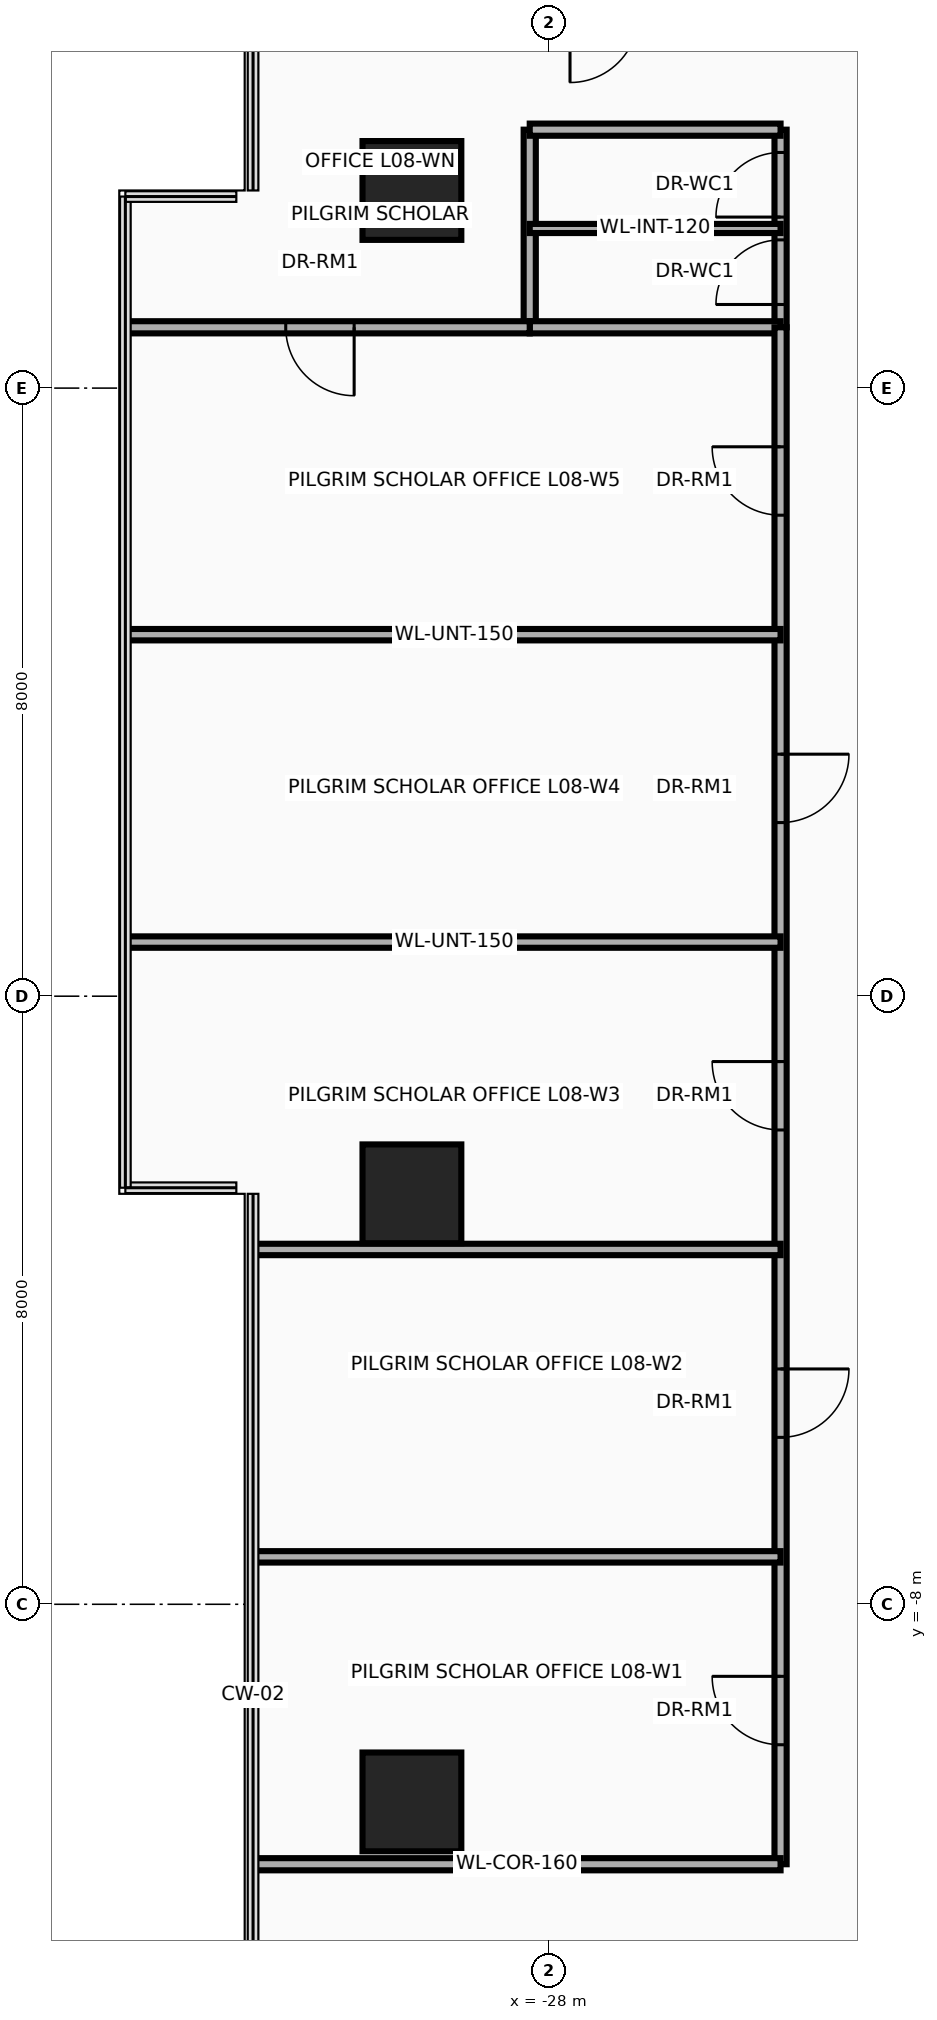
"""IFC4 building model, lengths in metres.
Left out: names, types, materials, properties, quantities, classifications, styles, units other than length and angle.
Written with IfcOpenShell. Run it as: python <this file> out.ifc"""

import sys

from ifc_helpers import new_model, si_unit, direction, frame, frame_2d, origin, origin_2d, place, context, subcontext, project, spatial, rectangle, circle, extrude, source, transform, mapped, element, fill, save


model = new_model("IFC4")
c1 = context("Model", 3, precision=1e-05, world=origin(), true_north=direction((0.0, 1.0)))
c2 = subcontext(c1, "Body", "Model", "MODEL_VIEW")
j1 = project(units=[si_unit("LENGTHUNIT", "METRE"), si_unit("PLANEANGLEUNIT", "RADIAN")], contexts=[c1])
p1 = place(None, origin())
s1 = spatial("IfcSite", under=j1, at=p1, CompositionType="ELEMENT")
p2 = place(p1, origin())
s2 = spatial("IfcBuilding", under=s1, at=p2, CompositionType="ELEMENT")
p3 = place(p2, frame((0.0, 0.0, 37.1)))
s3 = spatial("IfcBuildingStorey", under=s2, at=p3, CompositionType="ELEMENT", Elevation=37.1)
m1 = source(origin(), c2, "Body", "SweptSolid", [
    extrude(circle(Radius=0.65, at=origin_2d()), origin(), (0.0, 0.0, 1.0), 3.7),
])
for number, where, z_axis, x_axis in (
    (1, (-29.8, -10.6, 0.0), (0.0, 0.0, 1.0), (1.0, 0.0, 0.0)),
    (2, (-29.8, -2.6, 0.0), (0.0, 0.0, 1.0), (1.0, 0.0, 0.0)),
    (3, (-29.8, 10.6, 0.0), (0.0, 0.0, 1.0), (1.0, 0.0, 0.0)),
):
    element("IfcColumn", number, at=place(p3, frame(where, z_axis=z_axis, x_axis=x_axis)), inside=s3, PredefinedType="COLUMN", context=c2, shape_type="MappedRepresentation", body=[
        mapped(m1, transform((0.0, 0.0, 0.0), x_axis=(1.0, 0.0, 0.0), y_axis=(0.0, 1.0, 0.0), z_axis=(0.0, 0.0, 1.0), scale=1.0)),
    ])
p4 = place(p3, frame((-28.25, 8.8, 0.0), z_axis=(0.0, 0.0, 1.0), x_axis=(0.0, 1.0, 0.0)))
e4 = element("IfcWall", 4, at=p4, inside=s3, PredefinedType="PARTITIONING", context=c2, shape_type="SweptSolid", body=[
    extrude(rectangle(XDim=2.6, YDim=0.16, at=frame_2d((1.3, 0.0))), origin(), (0.0, 0.0, 1.0), 2.583),
])
p5 = place(p3, frame((-24.95, 8.8, 0.0), z_axis=(0.0, 0.0, 1.0), x_axis=(0.0, 1.0, 0.0)))
e5 = element("IfcWall", 5, at=p5, inside=s3, PredefinedType="PARTITIONING", context=c2, shape_type="SweptSolid", body=[
    extrude(rectangle(XDim=2.6, YDim=0.16, at=frame_2d((1.3, 0.0))), origin(), (0.0, 0.0, 1.0), 2.583),
])
p6 = place(p5, frame((0.3, 0.0, 0.0)))
e6 = element("IfcOpeningElement", 6, at=p6, cuts=e5, PredefinedType="OPENING", context=c2, shape_type="SweptSolid", body=[
    extrude(rectangle(XDim=0.85, YDim=2.1, at=frame_2d((0.425, 1.05))), frame((0.0, 0.095, 0.0), z_axis=(0.0, -1.0, 0.0), x_axis=(1.0, 0.0, 0.0)), (0.0, 0.0, 1.0), 0.19),
])
p7 = place(p5, frame((1.45, 0.0, 0.0)))
e7 = element("IfcOpeningElement", 7, at=p7, cuts=e5, PredefinedType="OPENING", context=c2, shape_type="SweptSolid", body=[
    extrude(rectangle(XDim=0.85, YDim=2.1, at=frame_2d((0.425, 1.05))), frame((0.0, 0.095, 0.0), z_axis=(0.0, -1.0, 0.0), x_axis=(1.0, 0.0, 0.0)), (0.0, 0.0, 1.0), 0.19),
])
for number, where, z_axis, x_axis in (
    (8, (-28.25, 8.8, 0.0), (0.0, 0.0, 1.0), (1.0, 0.0, 0.0)),
    (9, (-28.25, 11.4, 0.0), (0.0, 0.0, 1.0), (1.0, 0.0, 0.0)),
):
    element("IfcWall", number, at=place(p3, frame(where, z_axis=z_axis, x_axis=x_axis)), inside=s3, PredefinedType="PARTITIONING", context=c2, shape_type="SweptSolid", body=[
        extrude(rectangle(XDim=3.3, YDim=0.16, at=frame_2d((1.65, 0.0))), origin(), (0.0, 0.0, 1.0), 3.46),
    ])
p8 = place(p3, frame((-28.25, 10.1, 0.0), z_axis=(0.0, 0.0, 1.0), x_axis=(1.0, 0.0, 0.0)))
e10 = element("IfcWall", 10, at=p8, inside=s3, PredefinedType="PARTITIONING", context=c2, shape_type="SweptSolid", body=[
    extrude(rectangle(XDim=3.3, YDim=0.12, at=frame_2d((1.65, 0.0))), origin(), (0.0, 0.0, 1.0), 3.46),
])
p9 = place(p3, frame((-24.95, -11.42, 0.0), z_axis=(0.0, 0.0, 1.0), x_axis=(0.0, 1.0, 0.0)))
e11 = element("IfcWall", 11, at=p9, inside=s3, PredefinedType="PARTITIONING", context=c2, shape_type="SweptSolid", body=[
    extrude(rectangle(XDim=20.22, YDim=0.16, at=frame_2d((10.11, 0.0))), origin(), (0.0, 0.0, 1.0), 2.583),
])
p10 = place(p9, frame((1.572, 0.0, 0.0)))
e12 = element("IfcOpeningElement", 12, at=p10, cuts=e11, PredefinedType="OPENING", context=c2, shape_type="SweptSolid", body=[
    extrude(rectangle(XDim=0.9, YDim=2.1, at=frame_2d((0.45, 1.05))), frame((0.0, 0.095, 0.0), z_axis=(0.0, -1.0, 0.0), x_axis=(1.0, 0.0, 0.0)), (0.0, 0.0, 1.0), 0.19),
])
p11 = place(p9, frame((5.616, 0.0, 0.0)))
e13 = element("IfcOpeningElement", 13, at=p11, cuts=e11, PredefinedType="OPENING", context=c2, shape_type="SweptSolid", body=[
    extrude(rectangle(XDim=0.9, YDim=2.1, at=frame_2d((0.45, 1.05))), frame((0.0, 0.095, 0.0), z_axis=(0.0, -1.0, 0.0), x_axis=(1.0, 0.0, 0.0)), (0.0, 0.0, 1.0), 0.19),
])
p12 = place(p9, frame((9.66, 0.0, 0.0)))
e14 = element("IfcOpeningElement", 14, at=p12, cuts=e11, PredefinedType="OPENING", context=c2, shape_type="SweptSolid", body=[
    extrude(rectangle(XDim=0.9, YDim=2.1, at=frame_2d((0.45, 1.05))), frame((0.0, 0.095, 0.0), z_axis=(0.0, -1.0, 0.0), x_axis=(1.0, 0.0, 0.0)), (0.0, 0.0, 1.0), 0.19),
])
p13 = place(p9, frame((13.704, 0.0, 0.0)))
e15 = element("IfcOpeningElement", 15, at=p13, cuts=e11, PredefinedType="OPENING", context=c2, shape_type="SweptSolid", body=[
    extrude(rectangle(XDim=0.9, YDim=2.1, at=frame_2d((0.45, 1.05))), frame((0.0, 0.095, 0.0), z_axis=(0.0, -1.0, 0.0), x_axis=(1.0, 0.0, 0.0)), (0.0, 0.0, 1.0), 0.19),
])
p14 = place(p9, frame((17.748, 0.0, 0.0)))
e16 = element("IfcOpeningElement", 16, at=p14, cuts=e11, PredefinedType="OPENING", context=c2, shape_type="SweptSolid", body=[
    extrude(rectangle(XDim=0.9, YDim=2.1, at=frame_2d((0.45, 1.05))), frame((0.0, 0.095, 0.0), z_axis=(0.0, -1.0, 0.0), x_axis=(1.0, 0.0, 0.0)), (0.0, 0.0, 1.0), 0.19),
])
p15 = place(p3, frame((-33.54, 8.8, 0.0), z_axis=(0.0, 0.0, 1.0), x_axis=(1.0, 0.0, 0.0)))
e17 = element("IfcWall", 17, at=p15, inside=s3, PredefinedType="PARTITIONING", context=c2, shape_type="SweptSolid", body=[
    extrude(rectangle(XDim=5.29, YDim=0.16, at=frame_2d((2.645, 0.0))), origin(), (0.0, 0.0, 1.0), 2.896),
])
p16 = place(p15, frame((2.08, 0.0, 0.0)))
e18 = element("IfcOpeningElement", 18, at=p16, cuts=e17, PredefinedType="OPENING", context=c2, shape_type="SweptSolid", body=[
    extrude(rectangle(XDim=0.9, YDim=2.1, at=frame_2d((0.45, 1.05))), frame((0.0, 0.095, 0.0), z_axis=(0.0, -1.0, 0.0), x_axis=(1.0, 0.0, 0.0)), (0.0, 0.0, 1.0), 0.19),
])
for number, where, z_axis, x_axis in (
    (19, (-31.89, -7.376, 0.0), (0.0, 0.0, 1.0), (1.0, 0.0, 0.0)),
    (20, (-31.89, -3.332, 0.0), (0.0, 0.0, 1.0), (1.0, 0.0, 0.0)),
):
    element("IfcWall", number, at=place(p3, frame(where, z_axis=z_axis, x_axis=x_axis)), inside=s3, PredefinedType="PARTITIONING", context=c2, shape_type="SweptSolid", body=[
        extrude(rectangle(XDim=6.94, YDim=0.15, at=frame_2d((3.47, 0.0))), origin(), (0.0, 0.0, 1.0), 2.896),
    ])
for number, where, z_axis, x_axis in (
    (21, (-33.54, 0.712, 0.0), (0.0, 0.0, 1.0), (1.0, 0.0, 0.0)),
    (22, (-33.54, 4.756, 0.0), (0.0, 0.0, 1.0), (1.0, 0.0, 0.0)),
):
    element("IfcWall", number, at=place(p3, frame(where, z_axis=z_axis, x_axis=x_axis)), inside=s3, PredefinedType="PARTITIONING", context=c2, shape_type="SweptSolid", body=[
        extrude(rectangle(XDim=8.59, YDim=0.15, at=frame_2d((4.295, 0.0))), origin(), (0.0, 0.0, 1.0), 2.896),
    ])
p17 = place(p3, frame((-31.89, -11.42, 0.0), z_axis=(0.0, 0.0, 1.0), x_axis=(1.0, 0.0, 0.0)))
e23 = element("IfcWall", 23, at=p17, inside=s3, PredefinedType="PARTITIONING", context=c2, shape_type="SweptSolid", body=[
    extrude(rectangle(XDim=6.94, YDim=0.16, at=frame_2d((3.47, 0.0))), origin(), (0.0, 0.0, 1.0), 3.46),
])
p18 = place(p6, origin())
e24 = element("IfcDoor", 24, at=p18, inside=s3, OperationType="SINGLE_SWING_LEFT", PredefinedType="DOOR", context=c2, shape_type="SweptSolid", body=[
    extrude(rectangle(XDim=0.85, YDim=2.1, at=frame_2d((0.425, 1.05))), frame((0.0, 0.025, 0.0), z_axis=(0.0, -1.0, 0.0), x_axis=(1.0, 0.0, 0.0)), (0.0, 0.0, 1.0), 0.05),
])
fill(e6, e24)
p19 = place(p7, origin())
e25 = element("IfcDoor", 25, at=p19, inside=s3, OperationType="SINGLE_SWING_RIGHT", PredefinedType="DOOR", context=c2, shape_type="SweptSolid", body=[
    extrude(rectangle(XDim=0.85, YDim=2.1, at=frame_2d((0.425, 1.05))), frame((0.0, 0.025, 0.0), z_axis=(0.0, -1.0, 0.0), x_axis=(1.0, 0.0, 0.0)), (0.0, 0.0, 1.0), 0.05),
])
fill(e7, e25)
p20 = place(p16, frame((0.9, 0.0, 0.0), z_axis=(0.0, 0.0, 1.0), x_axis=(-1.0, 0.0, 0.0)))
e26 = element("IfcDoor", 26, at=p20, inside=s3, OperationType="SINGLE_SWING_LEFT", PredefinedType="DOOR", context=c2, shape_type="SweptSolid", body=[
    extrude(rectangle(XDim=0.9, YDim=2.1, at=frame_2d((0.45, 1.05))), frame((0.0, 0.025, 0.0), z_axis=(0.0, -1.0, 0.0), x_axis=(1.0, 0.0, 0.0)), (0.0, 0.0, 1.0), 0.05),
])
fill(e18, e26)
p21 = place(p10, origin())
e27 = element("IfcDoor", 27, at=p21, inside=s3, OperationType="SINGLE_SWING_RIGHT", PredefinedType="DOOR", context=c2, shape_type="SweptSolid", body=[
    extrude(rectangle(XDim=0.9, YDim=2.1, at=frame_2d((0.45, 1.05))), frame((0.0, 0.025, 0.0), z_axis=(0.0, -1.0, 0.0), x_axis=(1.0, 0.0, 0.0)), (0.0, 0.0, 1.0), 0.05),
])
fill(e12, e27)
p22 = place(p11, frame((0.9, 0.0, 0.0), z_axis=(0.0, 0.0, 1.0), x_axis=(-1.0, 0.0, 0.0)))
e28 = element("IfcDoor", 28, at=p22, inside=s3, OperationType="SINGLE_SWING_LEFT", PredefinedType="DOOR", context=c2, shape_type="SweptSolid", body=[
    extrude(rectangle(XDim=0.9, YDim=2.1, at=frame_2d((0.45, 1.05))), frame((0.0, 0.025, 0.0), z_axis=(0.0, -1.0, 0.0), x_axis=(1.0, 0.0, 0.0)), (0.0, 0.0, 1.0), 0.05),
])
fill(e13, e28)
p23 = place(p12, origin())
e29 = element("IfcDoor", 29, at=p23, inside=s3, OperationType="SINGLE_SWING_RIGHT", PredefinedType="DOOR", context=c2, shape_type="SweptSolid", body=[
    extrude(rectangle(XDim=0.9, YDim=2.1, at=frame_2d((0.45, 1.05))), frame((0.0, 0.025, 0.0), z_axis=(0.0, -1.0, 0.0), x_axis=(1.0, 0.0, 0.0)), (0.0, 0.0, 1.0), 0.05),
])
fill(e14, e29)
p24 = place(p13, frame((0.9, 0.0, 0.0), z_axis=(0.0, 0.0, 1.0), x_axis=(-1.0, 0.0, 0.0)))
e30 = element("IfcDoor", 30, at=p24, inside=s3, OperationType="SINGLE_SWING_LEFT", PredefinedType="DOOR", context=c2, shape_type="SweptSolid", body=[
    extrude(rectangle(XDim=0.9, YDim=2.1, at=frame_2d((0.45, 1.05))), frame((0.0, 0.025, 0.0), z_axis=(0.0, -1.0, 0.0), x_axis=(1.0, 0.0, 0.0)), (0.0, 0.0, 1.0), 0.05),
])
fill(e15, e30)
p25 = place(p14, origin())
e31 = element("IfcDoor", 31, at=p25, inside=s3, OperationType="SINGLE_SWING_RIGHT", PredefinedType="DOOR", context=c2, shape_type="SweptSolid", body=[
    extrude(rectangle(XDim=0.9, YDim=2.1, at=frame_2d((0.45, 1.05))), frame((0.0, 0.025, 0.0), z_axis=(0.0, -1.0, 0.0), x_axis=(1.0, 0.0, 0.0)), (0.0, 0.0, 1.0), 0.05),
])
fill(e16, e31)
save(model, sys.argv[1])
